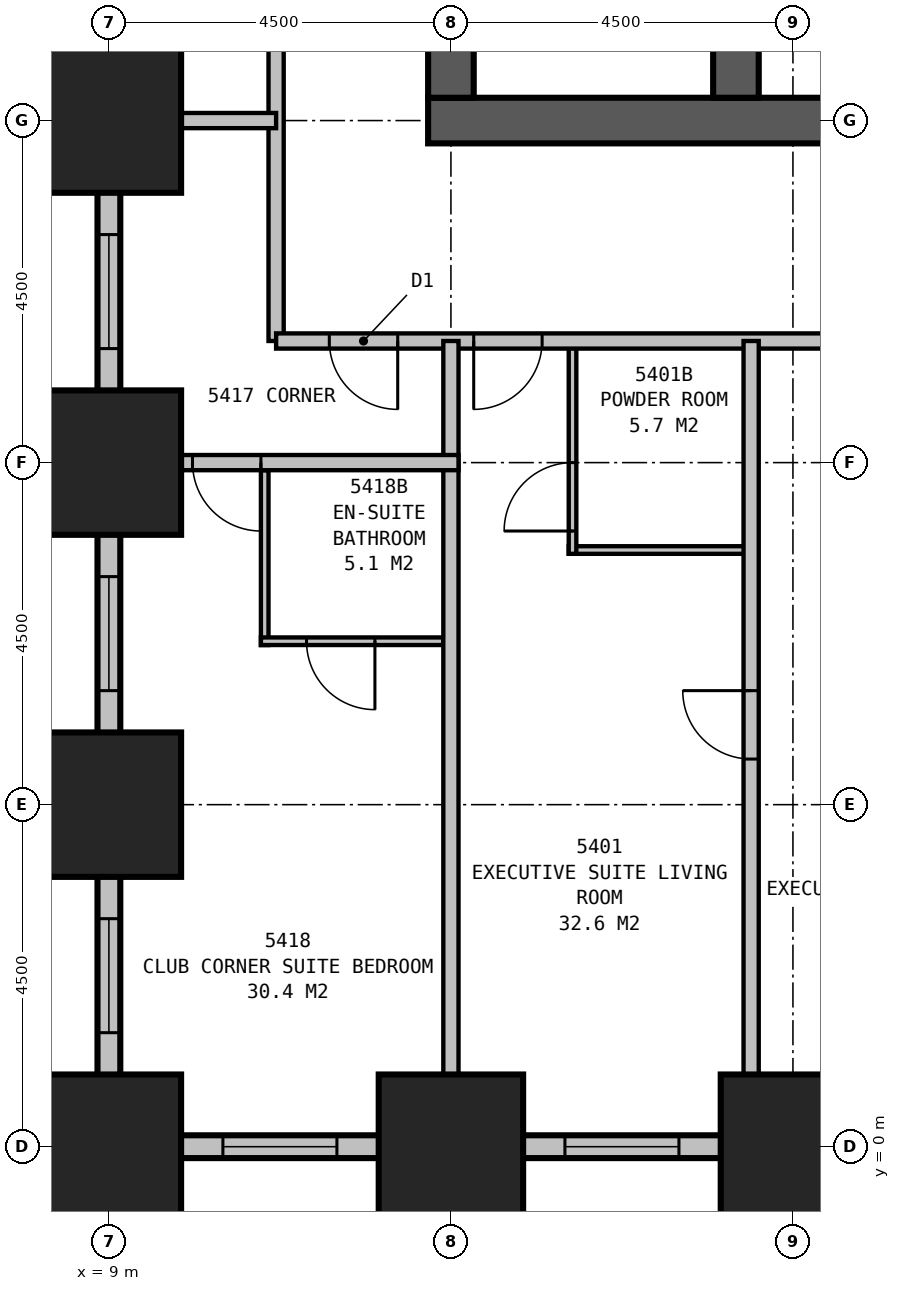
"""IFC4 building model, lengths in metres.
Left out: names, types, materials, properties, quantities, classifications, styles, units other than length and angle.
Written with IfcOpenShell. Run it as: python <this file> out.ifc"""

import sys

from ifc_helpers import new_model, si_unit, direction, frame, frame_2d, origin, origin_2d, place, context, subcontext, project, spatial, rectangle, extrude, element, fill, save


model = new_model("IFC4")
c1 = context("Model", 3, precision=1e-05, world=origin(), true_north=direction((0.0, 1.0)))
c2 = subcontext(c1, "Body", "Model", "MODEL_VIEW")
j1 = project(units=[si_unit("LENGTHUNIT", "METRE"), si_unit("PLANEANGLEUNIT", "RADIAN")], contexts=[c1])
p1 = place(None, origin())
s1 = spatial("IfcSite", under=j1, at=p1, CompositionType="ELEMENT")
p2 = place(p1, origin())
s2 = spatial("IfcBuilding", under=s1, at=p2, CompositionType="ELEMENT")
p3 = place(p2, frame((0.0, 0.0, 207.9)))
s3 = spatial("IfcBuildingStorey", under=s2, at=p3, CompositionType="ELEMENT", Elevation=207.9)
for number, where, z_axis, x_axis in (
    (1, (9.0, 13.5, 0.0), (0.0, 0.0, 1.0), (1.0, 0.0, 0.0)),
    (2, (9.0, 9.0, 0.0), (0.0, 0.0, 1.0), (1.0, 0.0, 0.0)),
    (3, (9.0, 4.5, 0.0), (0.0, 0.0, 1.0), (1.0, 0.0, 0.0)),
    (4, (9.0, 0.0, 0.0), (0.0, 0.0, 1.0), (1.0, 0.0, 0.0)),
    (5, (13.5, 0.0, 0.0), (0.0, 0.0, 1.0), (1.0, 0.0, 0.0)),
    (6, (18.0, 0.0, 0.0), (0.0, 0.0, 1.0), (1.0, 0.0, 0.0)),
):
    element("IfcColumn", number, at=place(p3, frame(where, z_axis=z_axis, x_axis=x_axis)), inside=s3, PredefinedType="COLUMN", context=c2, shape_type="SweptSolid", body=[
        extrude(rectangle(XDim=1.9, YDim=1.9, at=origin_2d()), origin(), (0.0, 0.0, 1.0), 3.5),
    ])
p4 = place(p3, frame((13.2, 13.5, 0.0), z_axis=(0.0, 0.0, 1.0), x_axis=(1.0, 0.0, 0.0)))
e7 = element("IfcWall", 7, at=p4, inside=s3, PredefinedType="SHEAR", context=c2, shape_type="SweptSolid", body=[
    extrude(rectangle(XDim=23.1, YDim=0.6, at=frame_2d((11.55, 0.0))), origin(), (0.0, 0.0, 1.0), 3.5),
])
p5 = place(p3, frame((17.25, 13.8, 0.0), z_axis=(0.0, 0.0, 1.0), x_axis=(0.0, 1.0, 0.0)))
e8 = element("IfcWall", 8, at=p5, inside=s3, PredefinedType="SHEAR", context=c2, shape_type="SweptSolid", body=[
    extrude(rectangle(XDim=12.9, YDim=0.6, at=frame_2d((6.45, 0.0))), origin(), (0.0, 0.0, 1.0), 3.5),
])
p6 = place(p5, frame((3.85, 0.0, 0.0)))
e9 = element("IfcOpeningElement", 9, at=p6, cuts=e8, PredefinedType="OPENING", context=c2, shape_type="SweptSolid", body=[
    extrude(rectangle(XDim=1.2, YDim=2.1, at=frame_2d((0.6, 1.05))), frame((0.0, 0.31, 0.0), z_axis=(0.0, -1.0, 0.0), x_axis=(1.0, 0.0, 0.0)), (0.0, 0.0, 1.0), 0.62),
])
p7 = place(p3, frame((13.5, 16.5, 0.0), z_axis=(0.0, 0.0, 1.0), x_axis=(0.0, -1.0, 0.0)))
e10 = element("IfcWall", 10, at=p7, inside=s3, PredefinedType="SHEAR", context=c2, shape_type="SweptSolid", body=[
    extrude(rectangle(XDim=2.7, YDim=0.6, at=frame_2d((1.35, 0.0))), origin(), (0.0, 0.0, 1.0), 3.5),
])
p8 = place(p3, frame((1.35, 13.5, 0.0), z_axis=(0.0, 0.0, 1.0), x_axis=(1.0, 0.0, 0.0)))
e11 = element("IfcWall", 11, at=p8, inside=s3, PredefinedType="STANDARD", context=c2, shape_type="SweptSolid", body=[
    extrude(rectangle(XDim=7.8, YDim=0.3, at=frame_2d((3.9, 0.0))), origin(), (0.0, 0.0, 1.0), 1.9),
])
p9 = place(p8, frame((4.65, 0.0, 0.5)))
e12 = element("IfcOpeningElement", 12, at=p9, cuts=e11, PredefinedType="OPENING", context=c2, shape_type="SweptSolid", body=[
    extrude(rectangle(XDim=1.5, YDim=1.2, at=frame_2d((0.75, 0.6))), frame((0.0, 0.16, 0.0), z_axis=(0.0, -1.0, 0.0), x_axis=(1.0, 0.0, 0.0)), (0.0, 0.0, 1.0), 0.32),
])
p10 = place(p3, frame((9.0, 13.65, 0.0), z_axis=(0.0, 0.0, 1.0), x_axis=(0.0, -1.0, 0.0)))
e13 = element("IfcWall", 13, at=p10, inside=s3, PredefinedType="STANDARD", context=c2, shape_type="SweptSolid", body=[
    extrude(rectangle(XDim=13.8, YDim=0.3, at=frame_2d((6.9, 0.0))), origin(), (0.0, 0.0, 1.0), 1.9),
])
p11 = place(p10, frame((1.65, 0.0, 0.5)))
e14 = element("IfcOpeningElement", 14, at=p11, cuts=e13, PredefinedType="OPENING", context=c2, shape_type="SweptSolid", body=[
    extrude(rectangle(XDim=1.5, YDim=1.2, at=frame_2d((0.75, 0.6))), frame((0.0, 0.16, 0.0), z_axis=(0.0, -1.0, 0.0), x_axis=(1.0, 0.0, 0.0)), (0.0, 0.0, 1.0), 0.32),
])
p12 = place(p10, frame((6.15, 0.0, 0.5)))
e15 = element("IfcOpeningElement", 15, at=p12, cuts=e13, PredefinedType="OPENING", context=c2, shape_type="SweptSolid", body=[
    extrude(rectangle(XDim=1.5, YDim=1.2, at=frame_2d((0.75, 0.6))), frame((0.0, 0.16, 0.0), z_axis=(0.0, -1.0, 0.0), x_axis=(1.0, 0.0, 0.0)), (0.0, 0.0, 1.0), 0.32),
])
p13 = place(p10, frame((10.65, 0.0, 0.5)))
e16 = element("IfcOpeningElement", 16, at=p13, cuts=e13, PredefinedType="OPENING", context=c2, shape_type="SweptSolid", body=[
    extrude(rectangle(XDim=1.5, YDim=1.2, at=frame_2d((0.75, 0.6))), frame((0.0, 0.16, 0.0), z_axis=(0.0, -1.0, 0.0), x_axis=(1.0, 0.0, 0.0)), (0.0, 0.0, 1.0), 0.32),
])
p14 = place(p3, frame((8.85, 0.0, 0.0), z_axis=(0.0, 0.0, 1.0), x_axis=(1.0, 0.0, 0.0)))
e17 = element("IfcWall", 17, at=p14, inside=s3, PredefinedType="STANDARD", context=c2, shape_type="SweptSolid", body=[
    extrude(rectangle(XDim=36.3, YDim=0.3, at=frame_2d((18.15, 0.0))), origin(), (0.0, 0.0, 1.0), 1.9),
])
p15 = place(p14, frame((1.65, 0.0, 0.5)))
e18 = element("IfcOpeningElement", 18, at=p15, cuts=e17, PredefinedType="OPENING", context=c2, shape_type="SweptSolid", body=[
    extrude(rectangle(XDim=1.5, YDim=1.2, at=frame_2d((0.75, 0.6))), frame((0.0, 0.16, 0.0), z_axis=(0.0, -1.0, 0.0), x_axis=(1.0, 0.0, 0.0)), (0.0, 0.0, 1.0), 0.32),
])
p16 = place(p14, frame((6.15, 0.0, 0.5)))
e19 = element("IfcOpeningElement", 19, at=p16, cuts=e17, PredefinedType="OPENING", context=c2, shape_type="SweptSolid", body=[
    extrude(rectangle(XDim=1.5, YDim=1.2, at=frame_2d((0.75, 0.6))), frame((0.0, 0.16, 0.0), z_axis=(0.0, -1.0, 0.0), x_axis=(1.0, 0.0, 0.0)), (0.0, 0.0, 1.0), 0.32),
])
p17 = place(p14, frame((10.65, 0.0, 0.5)))
e20 = element("IfcOpeningElement", 20, at=p17, cuts=e17, PredefinedType="OPENING", context=c2, shape_type="SweptSolid", body=[
    extrude(rectangle(XDim=1.5, YDim=1.2, at=frame_2d((0.75, 0.6))), frame((0.0, 0.16, 0.0), z_axis=(0.0, -1.0, 0.0), x_axis=(1.0, 0.0, 0.0)), (0.0, 0.0, 1.0), 0.32),
])
p18 = place(p14, frame((15.15, 0.0, 0.5)))
e21 = element("IfcOpeningElement", 21, at=p18, cuts=e17, PredefinedType="OPENING", context=c2, shape_type="SweptSolid", body=[
    extrude(rectangle(XDim=1.5, YDim=1.2, at=frame_2d((0.75, 0.6))), frame((0.0, 0.16, 0.0), z_axis=(0.0, -1.0, 0.0), x_axis=(1.0, 0.0, 0.0)), (0.0, 0.0, 1.0), 0.32),
])
p19 = place(p14, frame((19.65, 0.0, 0.5)))
e22 = element("IfcOpeningElement", 22, at=p19, cuts=e17, PredefinedType="OPENING", context=c2, shape_type="SweptSolid", body=[
    extrude(rectangle(XDim=1.5, YDim=1.2, at=frame_2d((0.75, 0.6))), frame((0.0, 0.16, 0.0), z_axis=(0.0, -1.0, 0.0), x_axis=(1.0, 0.0, 0.0)), (0.0, 0.0, 1.0), 0.32),
])
p20 = place(p14, frame((24.15, 0.0, 0.5)))
e23 = element("IfcOpeningElement", 23, at=p20, cuts=e17, PredefinedType="OPENING", context=c2, shape_type="SweptSolid", body=[
    extrude(rectangle(XDim=1.5, YDim=1.2, at=frame_2d((0.75, 0.6))), frame((0.0, 0.16, 0.0), z_axis=(0.0, -1.0, 0.0), x_axis=(1.0, 0.0, 0.0)), (0.0, 0.0, 1.0), 0.32),
])
p21 = place(p14, frame((28.65, 0.0, 0.5)))
e24 = element("IfcOpeningElement", 24, at=p21, cuts=e17, PredefinedType="OPENING", context=c2, shape_type="SweptSolid", body=[
    extrude(rectangle(XDim=1.5, YDim=1.2, at=frame_2d((0.75, 0.6))), frame((0.0, 0.16, 0.0), z_axis=(0.0, -1.0, 0.0), x_axis=(1.0, 0.0, 0.0)), (0.0, 0.0, 1.0), 0.32),
])
p22 = place(p14, frame((33.15, 0.0, 0.5)))
e25 = element("IfcOpeningElement", 25, at=p22, cuts=e17, PredefinedType="OPENING", context=c2, shape_type="SweptSolid", body=[
    extrude(rectangle(XDim=1.5, YDim=1.2, at=frame_2d((0.75, 0.6))), frame((0.0, 0.16, 0.0), z_axis=(0.0, -1.0, 0.0), x_axis=(1.0, 0.0, 0.0)), (0.0, 0.0, 1.0), 0.32),
])
p23 = place(p3, frame((11.2, 10.6, 0.0), z_axis=(0.0, 0.0, 1.0), x_axis=(1.0, 0.0, 0.0)))
e26 = element("IfcWall", 26, at=p23, inside=s3, PredefinedType="PARTITIONING", context=c2, shape_type="SweptSolid", body=[
    extrude(rectangle(XDim=27.1, YDim=0.2, at=frame_2d((13.55, 0.0))), origin(), (0.0, 0.0, 1.0), 3.25),
])
p24 = place(p23, frame((3.5, 0.0, 0.0), z_axis=(0.0, 0.0, 1.0), x_axis=(-1.0, 0.0, 0.0)))
e27 = element("IfcOpeningElement", 27, at=p24, cuts=e26, PredefinedType="OPENING", context=c2, shape_type="SweptSolid", body=[
    extrude(rectangle(XDim=0.9, YDim=2.1, at=frame_2d((0.45, 1.05))), frame((0.0, 0.11, 0.0), z_axis=(0.0, -1.0, 0.0), x_axis=(1.0, 0.0, 0.0)), (0.0, 0.0, 1.0), 0.22),
])
p25 = place(p23, frame((15.9, 0.0, 0.0), z_axis=(0.0, 0.0, 1.0), x_axis=(-1.0, 0.0, 0.0)))
e28 = element("IfcOpeningElement", 28, at=p25, cuts=e26, PredefinedType="OPENING", context=c2, shape_type="SweptSolid", body=[
    extrude(rectangle(XDim=1.0, YDim=2.1, at=frame_2d((0.5, 1.05))), frame((0.0, 0.11, 0.0), z_axis=(0.0, -1.0, 0.0), x_axis=(1.0, 0.0, 0.0)), (0.0, 0.0, 1.0), 0.22),
])
p26 = place(p23, frame((21.65, 0.0, 0.0), z_axis=(0.0, 0.0, 1.0), x_axis=(-1.0, 0.0, 0.0)))
e29 = element("IfcOpeningElement", 29, at=p26, cuts=e26, PredefinedType="OPENING", context=c2, shape_type="SweptSolid", body=[
    extrude(rectangle(XDim=0.9, YDim=2.1, at=frame_2d((0.45, 1.05))), frame((0.0, 0.11, 0.0), z_axis=(0.0, -1.0, 0.0), x_axis=(1.0, 0.0, 0.0)), (0.0, 0.0, 1.0), 0.22),
])
p27 = place(p23, frame((1.6, 0.0, 0.0), z_axis=(0.0, 0.0, 1.0), x_axis=(-1.0, 0.0, 0.0)))
e30 = element("IfcOpeningElement", 30, at=p27, cuts=e26, PredefinedType="OPENING", context=c2, shape_type="SweptSolid", body=[
    extrude(rectangle(XDim=0.9, YDim=2.1, at=frame_2d((0.45, 1.05))), frame((0.0, 0.11, 0.0), z_axis=(0.0, -1.0, 0.0), x_axis=(1.0, 0.0, 0.0)), (0.0, 0.0, 1.0), 0.22),
])
p28 = place(p23, frame((26.4, 0.0, 0.0), z_axis=(0.0, 0.0, 1.0), x_axis=(-1.0, 0.0, 0.0)))
e31 = element("IfcOpeningElement", 31, at=p28, cuts=e26, PredefinedType="OPENING", context=c2, shape_type="SweptSolid", body=[
    extrude(rectangle(XDim=0.9, YDim=2.1, at=frame_2d((0.45, 1.05))), frame((0.0, 0.11, 0.0), z_axis=(0.0, -1.0, 0.0), x_axis=(1.0, 0.0, 0.0)), (0.0, 0.0, 1.0), 0.22),
])
p29 = place(p3, frame((11.2, 10.6, 0.0), z_axis=(0.0, 0.0, 1.0), x_axis=(0.0, 1.0, 0.0)))
e32 = element("IfcWall", 32, at=p29, inside=s3, PredefinedType="PARTITIONING", context=c2, shape_type="SweptSolid", body=[
    extrude(rectangle(XDim=18.7, YDim=0.2, at=frame_2d((9.35, 0.0))), origin(), (0.0, 0.0, 1.0), 3.25),
])
p30 = place(p29, frame((4.6, 0.0, 0.0)))
e33 = element("IfcOpeningElement", 33, at=p30, cuts=e32, PredefinedType="OPENING", context=c2, shape_type="SweptSolid", body=[
    extrude(rectangle(XDim=1.0, YDim=2.1, at=frame_2d((0.5, 1.05))), frame((0.0, 0.11, 0.0), z_axis=(0.0, -1.0, 0.0), x_axis=(1.0, 0.0, 0.0)), (0.0, 0.0, 1.0), 0.22),
])
p31 = place(p29, frame((9.05, 0.0, 0.0)))
e34 = element("IfcOpeningElement", 34, at=p31, cuts=e32, PredefinedType="OPENING", context=c2, shape_type="SweptSolid", body=[
    extrude(rectangle(XDim=0.9, YDim=2.1, at=frame_2d((0.45, 1.05))), frame((0.0, 0.11, 0.0), z_axis=(0.0, -1.0, 0.0), x_axis=(1.0, 0.0, 0.0)), (0.0, 0.0, 1.0), 0.22),
])
p32 = place(p3, frame((17.45, 10.6, 0.0), z_axis=(0.0, 0.0, 1.0), x_axis=(0.0, -1.0, 0.0)))
e35 = element("IfcWall", 35, at=p32, inside=s3, PredefinedType="PARTITIONING", context=c2, shape_type="SweptSolid", body=[
    extrude(rectangle(XDim=10.6, YDim=0.2, at=frame_2d((5.3, 0.0))), origin(), (0.0, 0.0, 1.0), 2.2),
])
p33 = place(p32, frame((5.5, 0.0, 0.0), z_axis=(0.0, 0.0, 1.0), x_axis=(-1.0, 0.0, 0.0)))
e36 = element("IfcOpeningElement", 36, at=p33, cuts=e35, PredefinedType="OPENING", context=c2, shape_type="SweptSolid", body=[
    extrude(rectangle(XDim=0.9, YDim=2.1, at=frame_2d((0.45, 1.05))), frame((0.0, 0.11, 0.0), z_axis=(0.0, -1.0, 0.0), x_axis=(1.0, 0.0, 0.0)), (0.0, 0.0, 1.0), 0.22),
])
p34 = place(p3, frame((15.05, 7.85, 0.0), z_axis=(0.0, 0.0, 1.0), x_axis=(1.0, 0.0, 0.0)))
e37 = element("IfcWall", 37, at=p34, inside=s3, PredefinedType="PLUMBINGWALL", context=c2, shape_type="SweptSolid", body=[
    extrude(rectangle(XDim=2.4, YDim=0.1, at=frame_2d((1.2, 0.0))), origin(), (0.0, 0.0, 1.0), 3.25),
])
p35 = place(p3, frame((15.1, 10.6, 0.0), z_axis=(0.0, 0.0, 1.0), x_axis=(0.0, -1.0, 0.0)))
e38 = element("IfcWall", 38, at=p35, inside=s3, PredefinedType="PLUMBINGWALL", context=c2, shape_type="SweptSolid", body=[
    extrude(rectangle(XDim=2.8, YDim=0.1, at=frame_2d((1.4, 0.0))), origin(), (0.0, 0.0, 1.0), 3.25),
])
p36 = place(p35, frame((2.5, 0.0, 0.0), z_axis=(0.0, 0.0, 1.0), x_axis=(-1.0, 0.0, 0.0)))
e39 = element("IfcOpeningElement", 39, at=p36, cuts=e38, PredefinedType="OPENING", context=c2, shape_type="SweptSolid", body=[
    extrude(rectangle(XDim=0.9, YDim=2.1, at=frame_2d((0.45, 1.05))), frame((0.0, 0.06, 0.0), z_axis=(0.0, -1.0, 0.0), x_axis=(1.0, 0.0, 0.0)), (0.0, 0.0, 1.0), 0.12),
])
p37 = place(p3, frame((11.2, 13.5, 0.0), z_axis=(0.0, 0.0, 1.0), x_axis=(-1.0, 0.0, 0.0)))
e40 = element("IfcWall", 40, at=p37, inside=s3, PredefinedType="PARTITIONING", context=c2, shape_type="SweptSolid", body=[
    extrude(rectangle(XDim=2.2, YDim=0.2, at=frame_2d((1.1, 0.0))), origin(), (0.0, 0.0, 1.0), 1.9),
])
p38 = place(p3, frame((13.5, 10.6, 0.0), z_axis=(0.0, 0.0, 1.0), x_axis=(0.0, -1.0, 0.0)))
e41 = element("IfcWall", 41, at=p38, inside=s3, PredefinedType="PARTITIONING", context=c2, shape_type="SweptSolid", body=[
    extrude(rectangle(XDim=10.6, YDim=0.2, at=frame_2d((5.3, 0.0))), origin(), (0.0, 0.0, 1.0), 2.2),
])
p39 = place(p3, frame((13.6, 9.0, 0.0), z_axis=(0.0, 0.0, 1.0), x_axis=(-1.0, 0.0, 0.0)))
e42 = element("IfcWall", 42, at=p39, inside=s3, PredefinedType="PARTITIONING", context=c2, shape_type="SweptSolid", body=[
    extrude(rectangle(XDim=4.6, YDim=0.2, at=frame_2d((2.3, 0.0))), origin(), (0.0, 0.0, 1.0), 3.25),
])
p40 = place(p39, frame((2.6, 0.0, 0.0)))
e43 = element("IfcOpeningElement", 43, at=p40, cuts=e42, PredefinedType="OPENING", context=c2, shape_type="SweptSolid", body=[
    extrude(rectangle(XDim=0.9, YDim=2.1, at=frame_2d((0.45, 1.05))), frame((0.0, 0.11, 0.0), z_axis=(0.0, -1.0, 0.0), x_axis=(1.0, 0.0, 0.0)), (0.0, 0.0, 1.0), 0.22),
])
p41 = place(p3, frame((11.05, 8.9, 0.0), z_axis=(0.0, 0.0, 1.0), x_axis=(0.0, -1.0, 0.0)))
e44 = element("IfcWall", 44, at=p41, inside=s3, PredefinedType="PLUMBINGWALL", context=c2, shape_type="SweptSolid", body=[
    extrude(rectangle(XDim=2.3, YDim=0.1, at=frame_2d((1.15, 0.0))), origin(), (0.0, 0.0, 1.0), 3.25),
])
p42 = place(p3, frame((13.4, 6.65, 0.0), z_axis=(0.0, 0.0, 1.0), x_axis=(-1.0, 0.0, 0.0)))
e45 = element("IfcWall", 45, at=p42, inside=s3, PredefinedType="PLUMBINGWALL", context=c2, shape_type="SweptSolid", body=[
    extrude(rectangle(XDim=2.4, YDim=0.1, at=frame_2d((1.2, 0.0))), origin(), (0.0, 0.0, 1.0), 3.25),
])
p43 = place(p42, frame((0.9, 0.0, 0.0)))
e46 = element("IfcOpeningElement", 46, at=p43, cuts=e45, PredefinedType="OPENING", context=c2, shape_type="SweptSolid", body=[
    extrude(rectangle(XDim=0.9, YDim=2.1, at=frame_2d((0.45, 1.05))), frame((0.0, 0.06, 0.0), z_axis=(0.0, -1.0, 0.0), x_axis=(1.0, 0.0, 0.0)), (0.0, 0.0, 1.0), 0.12),
])
p44 = place(p11, origin())
e47 = element("IfcWindow", 47, at=p44, inside=s3, PartitioningType="SINGLE_PANEL", PredefinedType="WINDOW", context=c2, shape_type="SweptSolid", body=[
    extrude(rectangle(XDim=1.5, YDim=1.2, at=frame_2d((0.75, 0.6))), frame((0.0, 0.03, 0.0), z_axis=(0.0, -1.0, 0.0), x_axis=(1.0, 0.0, 0.0)), (0.0, 0.0, 1.0), 0.06),
])
fill(e14, e47)
p45 = place(p12, origin())
e48 = element("IfcWindow", 48, at=p45, inside=s3, PartitioningType="SINGLE_PANEL", PredefinedType="WINDOW", context=c2, shape_type="SweptSolid", body=[
    extrude(rectangle(XDim=1.5, YDim=1.2, at=frame_2d((0.75, 0.6))), frame((0.0, 0.03, 0.0), z_axis=(0.0, -1.0, 0.0), x_axis=(1.0, 0.0, 0.0)), (0.0, 0.0, 1.0), 0.06),
])
fill(e15, e48)
p46 = place(p13, origin())
e49 = element("IfcWindow", 49, at=p46, inside=s3, PartitioningType="SINGLE_PANEL", PredefinedType="WINDOW", context=c2, shape_type="SweptSolid", body=[
    extrude(rectangle(XDim=1.5, YDim=1.2, at=frame_2d((0.75, 0.6))), frame((0.0, 0.03, 0.0), z_axis=(0.0, -1.0, 0.0), x_axis=(1.0, 0.0, 0.0)), (0.0, 0.0, 1.0), 0.06),
])
fill(e16, e49)
p47 = place(p15, origin())
e50 = element("IfcWindow", 50, at=p47, inside=s3, PartitioningType="SINGLE_PANEL", PredefinedType="WINDOW", context=c2, shape_type="SweptSolid", body=[
    extrude(rectangle(XDim=1.5, YDim=1.2, at=frame_2d((0.75, 0.6))), frame((0.0, 0.03, 0.0), z_axis=(0.0, -1.0, 0.0), x_axis=(1.0, 0.0, 0.0)), (0.0, 0.0, 1.0), 0.06),
])
fill(e18, e50)
p48 = place(p16, origin())
e51 = element("IfcWindow", 51, at=p48, inside=s3, PartitioningType="SINGLE_PANEL", PredefinedType="WINDOW", context=c2, shape_type="SweptSolid", body=[
    extrude(rectangle(XDim=1.5, YDim=1.2, at=frame_2d((0.75, 0.6))), frame((0.0, 0.03, 0.0), z_axis=(0.0, -1.0, 0.0), x_axis=(1.0, 0.0, 0.0)), (0.0, 0.0, 1.0), 0.06),
])
fill(e19, e51)
p49 = place(p24, origin())
e52 = element("IfcDoor", 52, at=p49, inside=s3, OperationType="SINGLE_SWING_RIGHT", PredefinedType="DOOR", context=c2, shape_type="SweptSolid", body=[
    extrude(rectangle(XDim=0.9, YDim=2.1, at=frame_2d((0.45, 1.05))), frame((0.0, 0.025, 0.0), z_axis=(0.0, -1.0, 0.0), x_axis=(1.0, 0.0, 0.0)), (0.0, 0.0, 1.0), 0.05),
])
fill(e27, e52)
p50 = place(p27, origin())
e53 = element("IfcDoor", 53, at=p50, inside=s3, OperationType="SINGLE_SWING_LEFT", PredefinedType="DOOR", context=c2, shape_type="SweptSolid", body=[
    extrude(rectangle(XDim=0.9, YDim=2.1, at=frame_2d((0.45, 1.05))), frame((0.0, 0.025, 0.0), z_axis=(0.0, -1.0, 0.0), x_axis=(1.0, 0.0, 0.0)), (0.0, 0.0, 1.0), 0.05),
])
fill(e30, e53)
p51 = place(p33, origin())
e54 = element("IfcDoor", 54, at=p51, inside=s3, OperationType="SINGLE_SWING_RIGHT", PredefinedType="DOOR", context=c2, shape_type="SweptSolid", body=[
    extrude(rectangle(XDim=0.9, YDim=2.1, at=frame_2d((0.45, 1.05))), frame((0.0, 0.025, 0.0), z_axis=(0.0, -1.0, 0.0), x_axis=(1.0, 0.0, 0.0)), (0.0, 0.0, 1.0), 0.05),
])
fill(e36, e54)
p52 = place(p36, origin())
e55 = element("IfcDoor", 55, at=p52, inside=s3, OperationType="SINGLE_SWING_LEFT", PredefinedType="DOOR", context=c2, shape_type="SweptSolid", body=[
    extrude(rectangle(XDim=0.9, YDim=2.1, at=frame_2d((0.45, 1.05))), frame((0.0, 0.025, 0.0), z_axis=(0.0, -1.0, 0.0), x_axis=(1.0, 0.0, 0.0)), (0.0, 0.0, 1.0), 0.05),
])
fill(e39, e55)
p53 = place(p40, origin())
e56 = element("IfcDoor", 56, at=p53, inside=s3, OperationType="SINGLE_SWING_LEFT", PredefinedType="DOOR", context=c2, shape_type="SweptSolid", body=[
    extrude(rectangle(XDim=0.9, YDim=2.1, at=frame_2d((0.45, 1.05))), frame((0.0, 0.025, 0.0), z_axis=(0.0, -1.0, 0.0), x_axis=(1.0, 0.0, 0.0)), (0.0, 0.0, 1.0), 0.05),
])
fill(e43, e56)
p54 = place(p43, origin())
e57 = element("IfcDoor", 57, at=p54, inside=s3, OperationType="SINGLE_SWING_LEFT", PredefinedType="DOOR", context=c2, shape_type="SweptSolid", body=[
    extrude(rectangle(XDim=0.9, YDim=2.1, at=frame_2d((0.45, 1.05))), frame((0.0, 0.025, 0.0), z_axis=(0.0, -1.0, 0.0), x_axis=(1.0, 0.0, 0.0)), (0.0, 0.0, 1.0), 0.05),
])
fill(e46, e57)
save(model, sys.argv[1])
